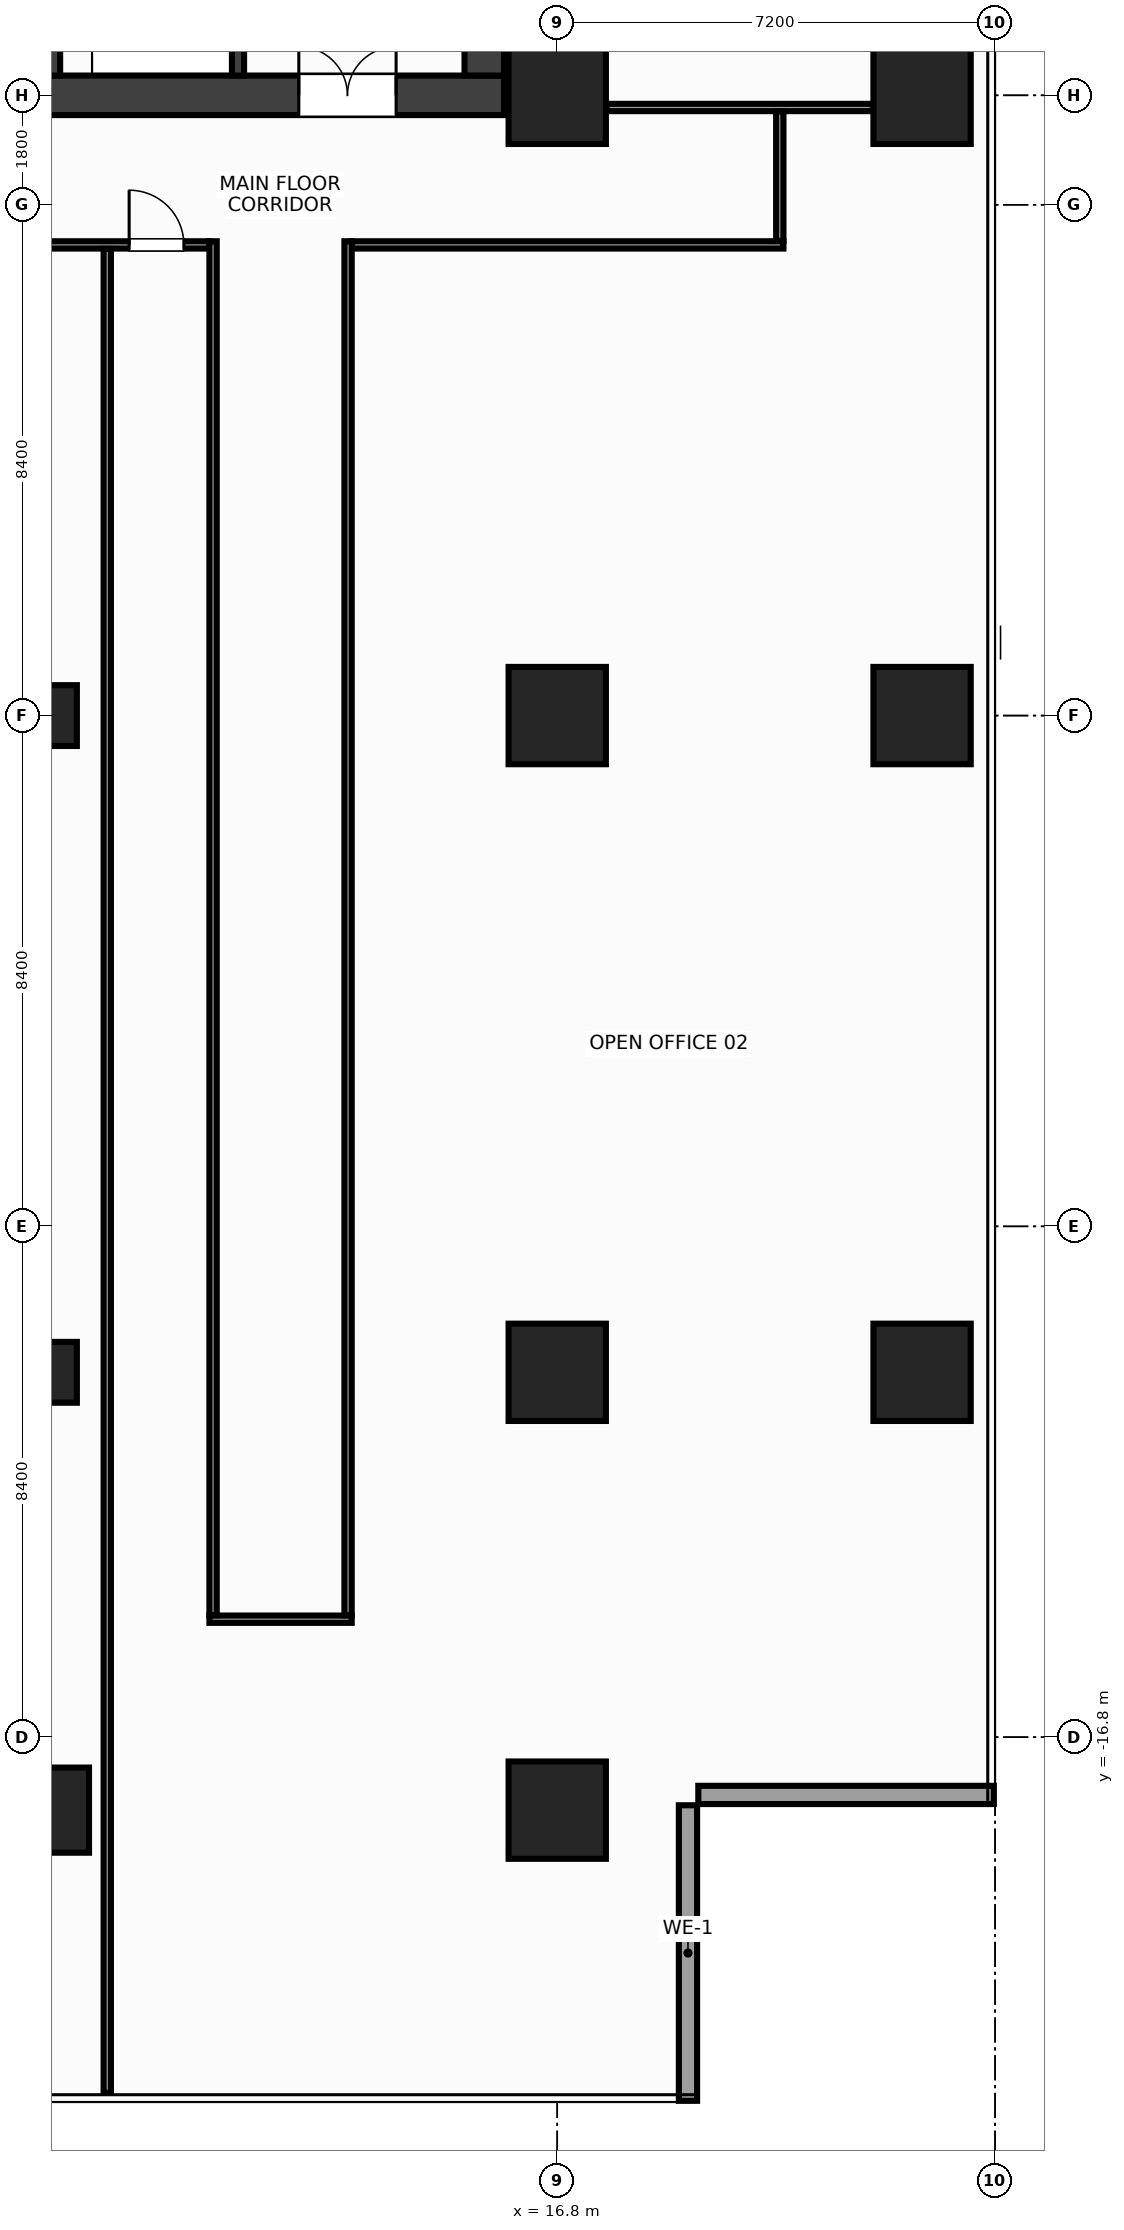
"""IFC4 building model, lengths in metres.
Left out: names, types, materials, properties, quantities, classifications, styles, units other than length and angle.
Written with IfcOpenShell. Run it as: python <this file> out.ifc"""

import sys

from ifc_helpers import new_model, si_unit, direction, frame, frame_2d, origin, origin_2d, place, context, subcontext, project, spatial, rectangle, hollow_rectangle, extrude, source, transform, mapped, element, fill, save


model = new_model("IFC4")
c1 = context("Model", 3, precision=1e-05, world=origin(), true_north=direction((0.0, 1.0)))
c2 = subcontext(c1, "Body", "Model", "MODEL_VIEW")
j1 = project(units=[si_unit("LENGTHUNIT", "METRE"), si_unit("PLANEANGLEUNIT", "RADIAN")], contexts=[c1])
p1 = place(None, origin())
s1 = spatial("IfcSite", under=j1, at=p1, CompositionType="ELEMENT")
p2 = place(p1, origin())
s2 = spatial("IfcBuilding", under=s1, at=p2, CompositionType="ELEMENT")
p3 = place(p2, frame((0.0, 0.0, 135.2)))
s3 = spatial("IfcBuildingStorey", under=s2, at=p3, CompositionType="ELEMENT", Elevation=135.2)
m1 = source(origin(), c2, "Body", "SweptSolid", [
    extrude(rectangle(XDim=31.85, YDim=0.65, at=frame_2d((15.925, 0.0))), origin(), (0.0, 0.0, 1.0), 3.6),
])
p4 = place(p3, frame((-15.925, 10.2, 0.0), z_axis=(0.0, 0.0, 1.0), x_axis=(1.0, 0.0, 0.0)))
e1 = element("IfcWall", 1, at=p4, inside=s3, PredefinedType="SHEAR", context=c2, shape_type="MappedRepresentation", body=[
    mapped(m1, transform((0.0, 0.0, 0.0), x_axis=(1.0, 0.0, 0.0), y_axis=(0.0, 1.0, 0.0), z_axis=(0.0, 0.0, 1.0), scale=1.0)),
])
p5 = place(p4, frame((1.775, 0.0, 0.0)))
e2 = element("IfcOpeningElement", 2, at=p5, cuts=e1, PredefinedType="OPENING", context=c2, shape_type="SweptSolid", body=[
    extrude(rectangle(XDim=1.6, YDim=2.15, at=frame_2d((0.8, 1.075))), frame((0.0, 0.337, 0.0), z_axis=(0.0, -1.0, 0.0), x_axis=(1.0, 0.0, 0.0)), (0.0, 0.0, 1.0), 0.674),
])
p6 = place(p4, frame((28.475, 0.0, 0.0)))
e3 = element("IfcOpeningElement", 3, at=p6, cuts=e1, PredefinedType="OPENING", context=c2, shape_type="SweptSolid", body=[
    extrude(rectangle(XDim=1.6, YDim=2.15, at=frame_2d((0.8, 1.075))), frame((0.0, 0.337, 0.0), z_axis=(0.0, -1.0, 0.0), x_axis=(1.0, 0.0, 0.0)), (0.0, 0.0, 1.0), 0.674),
])
p7 = place(p4, frame((15.175, 0.0, 0.0)))
e4 = element("IfcOpeningElement", 4, at=p7, cuts=e1, PredefinedType="OPENING", context=c2, shape_type="SweptSolid", body=[
    extrude(rectangle(XDim=1.5, YDim=2.2, at=frame_2d((0.75, 1.1))), frame((0.0, 0.337, 0.0), z_axis=(0.0, -1.0, 0.0), x_axis=(1.0, 0.0, 0.0)), (0.0, 0.0, 1.0), 0.674),
])
m2 = source(origin(), c2, "Body", "SweptSolid", [
    extrude(rectangle(XDim=12.95, YDim=0.65, at=frame_2d((6.475, 0.0))), origin(), (0.0, 0.0, 1.0), 3.6),
])
p8 = place(p3, frame((15.6, 10.525, 0.0), z_axis=(0.0, 0.0, 1.0), x_axis=(0.0, 1.0, 0.0)))
e5 = element("IfcWall", 5, at=p8, inside=s3, PredefinedType="SHEAR", context=c2, shape_type="MappedRepresentation", body=[
    mapped(m2, transform((0.0, 0.0, 0.0), x_axis=(1.0, 0.0, 0.0), y_axis=(0.0, 1.0, 0.0), z_axis=(0.0, 0.0, 1.0), scale=1.0)),
])
m3 = source(origin(), c2, "Body", "SweptSolid", [
    extrude(rectangle(XDim=12.95, YDim=0.25, at=frame_2d((6.475, 0.0))), origin(), (0.0, 0.0, 1.0), 3.6),
])
p9 = place(p3, frame((8.5, 10.525, 0.0), z_axis=(0.0, 0.0, 1.0), x_axis=(0.0, 1.0, 0.0)))
e6 = element("IfcWall", 6, at=p9, inside=s3, PredefinedType="SHEAR", context=c2, shape_type="MappedRepresentation", body=[
    mapped(m3, transform((0.0, 0.0, 0.0), x_axis=(1.0, 0.0, 0.0), y_axis=(0.0, 1.0, 0.0), z_axis=(0.0, 0.0, 1.0), scale=1.0)),
])
p10 = place(p9, frame((9.925, 0.0, 0.0)))
e7 = element("IfcOpeningElement", 7, at=p10, cuts=e6, PredefinedType="OPENING", context=c2, shape_type="SweptSolid", body=[
    extrude(rectangle(XDim=0.95, YDim=2.15, at=frame_2d((0.475, 1.075))), frame((0.0, 0.137, 0.0), z_axis=(0.0, -1.0, 0.0), x_axis=(1.0, 0.0, 0.0)), (0.0, 0.0, 1.0), 0.274),
])
m4 = source(origin(), c2, "Body", "SweptSolid", [
    extrude(rectangle(XDim=3.125, YDim=0.2, at=frame_2d((1.562, 0.0))), origin(), (0.0, 0.0, 1.0), 3.6),
])
p11 = place(p3, frame((11.55, 10.525, 0.0), z_axis=(0.0, 0.0, 1.0), x_axis=(0.0, 1.0, 0.0)))
e8 = element("IfcWall", 8, at=p11, inside=s3, PredefinedType="SHEAR", context=c2, shape_type="MappedRepresentation", body=[
    mapped(m4, transform((0.0, 0.0, 0.0), x_axis=(1.0, 0.0, 0.0), y_axis=(0.0, 1.0, 0.0), z_axis=(0.0, 0.0, 1.0), scale=1.0)),
])
p12 = place(p11, frame((0.9, 0.0, 0.0)))
e9 = element("IfcOpeningElement", 9, at=p12, cuts=e8, PredefinedType="OPENING", context=c2, shape_type="SweptSolid", body=[
    extrude(rectangle(XDim=1.1, YDim=2.15, at=frame_2d((0.55, 1.075))), frame((0.0, 0.112, 0.0), z_axis=(0.0, -1.0, 0.0), x_axis=(1.0, 0.0, 0.0)), (0.0, 0.0, 1.0), 0.224),
])
m5 = source(origin(), c2, "Body", "SweptSolid", [
    extrude(rectangle(XDim=1.6, YDim=1.6, at=origin_2d()), origin(), (0.0, 0.0, 1.0), 3.6),
])
for number, where, z_axis, x_axis in (
    (10, (16.8, -18.0, 0.0), (0.0, 0.0, 1.0), (1.0, 0.0, 0.0)),
    (11, (16.8, -10.8, 0.0), (0.0, 0.0, 1.0), (1.0, 0.0, 0.0)),
    (12, (16.8, 0.0, 0.0), (0.0, 0.0, 1.0), (1.0, 0.0, 0.0)),
    (13, (16.8, 10.2, 0.0), (0.0, 0.0, 1.0), (1.0, 0.0, 0.0)),
    (14, (22.8, -10.8, 0.0), (0.0, 0.0, 1.0), (1.0, 0.0, 0.0)),
    (15, (22.8, 0.0, 0.0), (0.0, 0.0, 1.0), (1.0, 0.0, 0.0)),
    (16, (22.8, 10.2, 0.0), (0.0, 0.0, 1.0), (1.0, 0.0, 0.0)),
):
    element("IfcColumn", number, at=place(p3, frame(where, z_axis=z_axis, x_axis=x_axis)), inside=s3, PredefinedType="COLUMN", context=c2, shape_type="MappedRepresentation", body=[
        mapped(m5, transform((0.0, 0.0, 0.0), x_axis=(1.0, 0.0, 0.0), y_axis=(0.0, 1.0, 0.0), z_axis=(0.0, 0.0, 1.0), scale=1.0)),
    ])
m6 = source(origin(), c2, "Body", "SweptSolid", [
    extrude(rectangle(XDim=1.4, YDim=1.4, at=origin_2d()), origin(), (0.0, 0.0, 1.0), 3.6),
])
p13 = place(p3, frame((8.4, -18.0, 0.0), z_axis=(0.0, 0.0, 1.0), x_axis=(1.0, 0.0, 0.0)))
e17 = element("IfcColumn", 17, at=p13, inside=s3, PredefinedType="COLUMN", context=c2, shape_type="MappedRepresentation", body=[
    mapped(m6, transform((0.0, 0.0, 0.0), x_axis=(1.0, 0.0, 0.0), y_axis=(0.0, 1.0, 0.0), z_axis=(0.0, 0.0, 1.0), scale=1.0)),
])
m7 = source(origin(), c2, "Body", "SweptSolid", [
    extrude(hollow_rectangle(XDim=1.0, YDim=1.0, WallThickness=0.045, at=origin_2d()), origin(), (0.0, 0.0, 1.0), 3.6),
])
for number, where, z_axis, x_axis in (
    (18, (8.4, 0.0, 0.0), (0.0, 0.0, 1.0), (1.0, 0.0, 0.0)),
    (19, (8.4, -10.8, 0.0), (0.0, 0.0, 1.0), (1.0, 0.0, 0.0)),
):
    element("IfcColumn", number, at=place(p3, frame(where, z_axis=z_axis, x_axis=x_axis)), inside=s3, PredefinedType="COLUMN", context=c2, shape_type="MappedRepresentation", body=[
        mapped(m7, transform((0.0, 0.0, 0.0), x_axis=(1.0, 0.0, 0.0), y_axis=(0.0, 1.0, 0.0), z_axis=(0.0, 0.0, 1.0), scale=1.0)),
    ])
m8 = source(origin(), c2, "Body", "SweptSolid", [
    extrude(rectangle(XDim=4.86, YDim=0.3, at=frame_2d((2.43, 0.0))), origin(), (0.0, 0.0, 1.0), 2.76),
])
p14 = place(p3, frame((18.95, -22.78, 0.0), z_axis=(0.0, 0.0, 1.0), x_axis=(0.0, 1.0, 0.0)))
e20 = element("IfcWall", 20, at=p14, inside=s3, PredefinedType="STANDARD", context=c2, shape_type="MappedRepresentation", body=[
    mapped(m8, transform((0.0, 0.0, 0.0), x_axis=(1.0, 0.0, 0.0), y_axis=(0.0, 1.0, 0.0), z_axis=(0.0, 0.0, 1.0), scale=1.0)),
])
m9 = source(origin(), c2, "Body", "SweptSolid", [
    extrude(rectangle(XDim=4.86, YDim=0.3, at=frame_2d((2.43, 0.0))), origin(), (0.0, 0.0, 1.0), 2.76),
])
p15 = place(p3, frame((19.12, -17.75, 0.0), z_axis=(0.0, 0.0, 1.0), x_axis=(1.0, 0.0, 0.0)))
e21 = element("IfcWall", 21, at=p15, inside=s3, PredefinedType="STANDARD", context=c2, shape_type="MappedRepresentation", body=[
    mapped(m9, transform((0.0, 0.0, 0.0), x_axis=(1.0, 0.0, 0.0), y_axis=(0.0, 1.0, 0.0), z_axis=(0.0, 0.0, 1.0), scale=1.0)),
])
m10 = source(origin(), c2, "Body", "SweptSolid", [
    extrude(rectangle(XDim=4.38, YDim=0.12, at=frame_2d((2.19, 0.0))), origin(), (0.0, 0.0, 1.0), 2.915),
])
p16 = place(p3, frame((17.61, 10.0, 0.0), z_axis=(0.0, 0.0, 1.0), x_axis=(1.0, 0.0, 0.0)))
e22 = element("IfcWall", 22, at=p16, inside=s3, PredefinedType="PARTITIONING", context=c2, shape_type="MappedRepresentation", body=[
    mapped(m10, transform((0.0, 0.0, 0.0), x_axis=(1.0, 0.0, 0.0), y_axis=(0.0, 1.0, 0.0), z_axis=(0.0, 0.0, 1.0), scale=1.0)),
])
m11 = source(origin(), c2, "Body", "SweptSolid", [
    extrude(rectangle(XDim=31.6, YDim=0.12, at=frame_2d((15.8, 0.0))), origin(), (0.0, 0.0, 1.0), 2.765),
])
p17 = place(p3, frame((-20.52, 7.74, 0.0), z_axis=(0.0, 0.0, 1.0), x_axis=(1.0, 0.0, 0.0)))
e23 = element("IfcWall", 23, at=p17, inside=s3, PredefinedType="PARTITIONING", context=c2, shape_type="MappedRepresentation", body=[
    mapped(m11, transform((0.0, 0.0, 0.0), x_axis=(1.0, 0.0, 0.0), y_axis=(0.0, 1.0, 0.0), z_axis=(0.0, 0.0, 1.0), scale=1.0)),
])
p18 = place(p17, frame((1.74, 0.0, 0.0)))
e24 = element("IfcOpeningElement", 24, at=p18, cuts=e23, PredefinedType="OPENING", context=c2, shape_type="SweptSolid", body=[
    extrude(rectangle(XDim=0.9, YDim=2.15, at=frame_2d((0.45, 1.075))), frame((0.0, 0.072, 0.0), z_axis=(0.0, -1.0, 0.0), x_axis=(1.0, 0.0, 0.0)), (0.0, 0.0, 1.0), 0.144),
])
p19 = place(p17, frame((30.28, 0.0, 0.0)))
e25 = element("IfcOpeningElement", 25, at=p19, cuts=e23, PredefinedType="OPENING", context=c2, shape_type="SweptSolid", body=[
    extrude(rectangle(XDim=0.9, YDim=2.15, at=frame_2d((0.45, 1.075))), frame((0.0, 0.072, 0.0), z_axis=(0.0, -1.0, 0.0), x_axis=(1.0, 0.0, 0.0)), (0.0, 0.0, 1.0), 0.144),
])
p20 = place(p17, frame((10.67, 0.0, 0.0)))
e26 = element("IfcOpeningElement", 26, at=p20, cuts=e23, PredefinedType="OPENING", context=c2, shape_type="SweptSolid", body=[
    extrude(rectangle(XDim=0.9, YDim=2.15, at=frame_2d((0.45, 1.075))), frame((0.0, 0.072, 0.0), z_axis=(0.0, -1.0, 0.0), x_axis=(1.0, 0.0, 0.0)), (0.0, 0.0, 1.0), 0.144),
])
p21 = place(p17, frame((23.47, 0.0, 0.0)))
e27 = element("IfcOpeningElement", 27, at=p21, cuts=e23, PredefinedType="OPENING", context=c2, shape_type="SweptSolid", body=[
    extrude(rectangle(XDim=0.9, YDim=2.15, at=frame_2d((0.45, 1.075))), frame((0.0, 0.072, 0.0), z_axis=(0.0, -1.0, 0.0), x_axis=(1.0, 0.0, 0.0)), (0.0, 0.0, 1.0), 0.144),
])
m12 = source(origin(), c2, "Body", "SweptSolid", [
    extrude(rectangle(XDim=7.1, YDim=0.12, at=frame_2d((3.55, 0.0))), origin(), (0.0, 0.0, 1.0), 2.765),
])
p22 = place(p3, frame((13.42, 7.74, 0.0), z_axis=(0.0, 0.0, 1.0), x_axis=(1.0, 0.0, 0.0)))
e28 = element("IfcWall", 28, at=p22, inside=s3, PredefinedType="PARTITIONING", context=c2, shape_type="MappedRepresentation", body=[
    mapped(m12, transform((0.0, 0.0, 0.0), x_axis=(1.0, 0.0, 0.0), y_axis=(0.0, 1.0, 0.0), z_axis=(0.0, 0.0, 1.0), scale=1.0)),
])
m13 = source(origin(), c2, "Body", "SweptSolid", [
    extrude(rectangle(XDim=2.34, YDim=0.12, at=frame_2d((1.17, 0.0))), origin(), (0.0, 0.0, 1.0), 3.38),
])
p23 = place(p3, frame((11.08, -14.86, 0.0), z_axis=(0.0, 0.0, 1.0), x_axis=(1.0, 0.0, 0.0)))
e29 = element("IfcWall", 29, at=p23, inside=s3, PredefinedType="PARTITIONING", context=c2, shape_type="MappedRepresentation", body=[
    mapped(m13, transform((0.0, 0.0, 0.0), x_axis=(1.0, 0.0, 0.0), y_axis=(0.0, 1.0, 0.0), z_axis=(0.0, 0.0, 1.0), scale=1.0)),
])
m14 = source(origin(), c2, "Body", "SweptSolid", [
    extrude(rectangle(XDim=2.13, YDim=0.12, at=frame_2d((1.065, 0.0))), origin(), (0.0, 0.0, 1.0), 3.38),
])
p24 = place(p3, frame((20.46, 7.805, 0.0), z_axis=(0.0, 0.0, 1.0), x_axis=(0.0, 1.0, 0.0)))
e30 = element("IfcWall", 30, at=p24, inside=s3, PredefinedType="PARTITIONING", context=c2, shape_type="MappedRepresentation", body=[
    mapped(m14, transform((0.0, 0.0, 0.0), x_axis=(1.0, 0.0, 0.0), y_axis=(0.0, 1.0, 0.0), z_axis=(0.0, 0.0, 1.0), scale=1.0)),
])
m15 = source(origin(), c2, "Body", "SweptSolid", [
    extrude(rectangle(XDim=22.595, YDim=0.12, at=frame_2d((11.297, 0.0))), origin(), (0.0, 0.0, 1.0), 2.665),
])
for number, where, z_axis, x_axis in (
    (31, (11.14, -14.795, 0.0), (0.0, 0.0, 1.0), (0.0, 1.0, 0.0)),
    (32, (13.36, -14.795, 0.0), (0.0, 0.0, 1.0), (0.0, 1.0, 0.0)),
):
    element("IfcWall", number, at=place(p3, frame(where, z_axis=z_axis, x_axis=x_axis)), inside=s3, PredefinedType="PARTITIONING", context=c2, shape_type="MappedRepresentation", body=[
        mapped(m15, transform((0.0, 0.0, 0.0), x_axis=(1.0, 0.0, 0.0), y_axis=(0.0, 1.0, 0.0), z_axis=(0.0, 0.0, 1.0), scale=1.0)),
    ])
m16 = source(origin(), c2, "Body", "SweptSolid", [
    extrude(rectangle(XDim=30.325, YDim=0.12, at=frame_2d((15.163, 0.0))), origin(), (0.0, 0.0, 1.0), 2.665),
])
p25 = place(p3, frame((9.4, -22.65, 0.0), z_axis=(0.0, 0.0, 1.0), x_axis=(0.0, 1.0, 0.0)))
e33 = element("IfcWall", 33, at=p25, inside=s3, PredefinedType="PARTITIONING", context=c2, shape_type="MappedRepresentation", body=[
    mapped(m16, transform((0.0, 0.0, 0.0), x_axis=(1.0, 0.0, 0.0), y_axis=(0.0, 1.0, 0.0), z_axis=(0.0, 0.0, 1.0), scale=1.0)),
])
m17 = source(origin(), c2, "Body", "SweptSolid", [
    extrude(rectangle(XDim=1.6, YDim=2.15, at=frame_2d((0.8, 1.075))), frame((0.0, 0.025, 0.0), z_axis=(0.0, -1.0, 0.0), x_axis=(1.0, 0.0, 0.0)), (0.0, 0.0, 1.0), 0.05),
])
p26 = place(p6, origin())
e34 = element("IfcDoor", 34, at=p26, inside=s3, OperationType="DOUBLE_DOOR_SINGLE_SWING", PredefinedType="DOOR", context=c2, shape_type="MappedRepresentation", body=[
    mapped(m17, transform((0.0, 0.0, 0.0), x_axis=(1.0, 0.0, 0.0), y_axis=(0.0, 1.0, 0.0), z_axis=(0.0, 0.0, 1.0), scale=1.0)),
])
fill(e3, e34)
m18 = source(origin(), c2, "Body", "SweptSolid", [
    extrude(rectangle(XDim=0.9, YDim=2.15, at=frame_2d((0.45, 1.075))), frame((0.0, 0.025, 0.0), z_axis=(0.0, -1.0, 0.0), x_axis=(1.0, 0.0, 0.0)), (0.0, 0.0, 1.0), 0.05),
])
p27 = place(p19, origin())
e35 = element("IfcDoor", 35, at=p27, inside=s3, OperationType="SINGLE_SWING_LEFT", PredefinedType="DOOR", context=c2, shape_type="MappedRepresentation", body=[
    mapped(m18, transform((0.0, 0.0, 0.0), x_axis=(1.0, 0.0, 0.0), y_axis=(0.0, 1.0, 0.0), z_axis=(0.0, 0.0, 1.0), scale=1.0)),
])
fill(e25, e35)
save(model, sys.argv[1])
